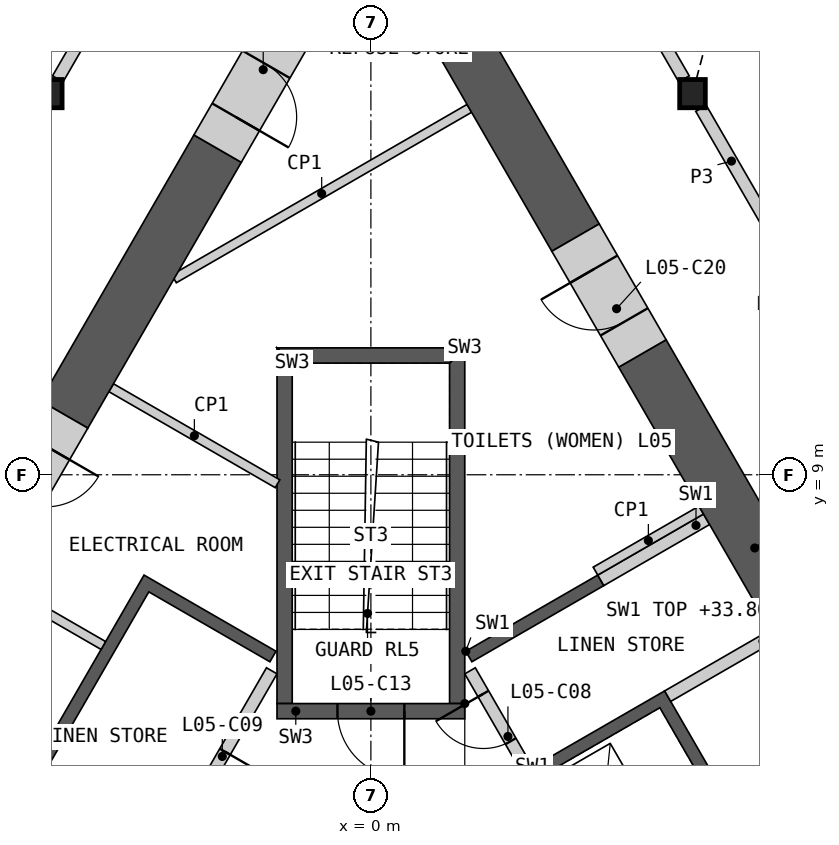
"""IFC4 building model, lengths in metres.
Left out: names, types, materials, properties, quantities, classifications, styles, units other than length and angle.
Written with IfcOpenShell. Run it as: python <this file> out.ifc"""

import sys

from ifc_helpers import new_model, si_unit, direction, frame, frame_2d, origin, origin_2d, place, context, subcontext, project, spatial, polyline, rectangle, i_section, outline, extrude, element, fill, save


model = new_model("IFC4")
c1 = context("Model", 3, precision=1e-05, world=origin(), true_north=direction((0.0, 1.0)))
c2 = subcontext(c1, "Body", "Model", "MODEL_VIEW")
j1 = project(units=[si_unit("LENGTHUNIT", "METRE"), si_unit("PLANEANGLEUNIT", "RADIAN")], contexts=[c1])
p1 = place(None, origin())
s1 = spatial("IfcSite", under=j1, at=p1, CompositionType="ELEMENT")
p2 = place(p1, origin())
s2 = spatial("IfcBuilding", under=s1, at=p2, CompositionType="ELEMENT")
p3 = place(p2, frame((0.0, 0.0, 30.0)))
s3 = spatial("IfcBuildingStorey", under=s2, at=p3, CompositionType="ELEMENT", Elevation=30.0)
for number, where, z_axis, x_axis in (
    (1, (-5.289, 15.269, 0.0), (0.0, 0.0, 1.0), (1.0, 0.0, 0.0)),
    (2, (5.289, 15.269, 0.0), (0.0, 0.0, 1.0), (1.0, 0.0, 0.0)),
):
    element("IfcColumn", number, at=place(p3, frame(where, z_axis=z_axis, x_axis=x_axis)), inside=s3, PredefinedType="COLUMN", context=c2, shape_type="SweptSolid", body=[
        extrude(i_section(OverallWidth=0.421, OverallDepth=0.465, WebThickness=0.045, FlangeThickness=0.072, at=origin_2d()), origin(), (0.0, 0.0, 1.0), 4.2),
    ])
p4 = place(p3, origin())
e3 = element("IfcWall", 3, at=p4, inside=s3, PredefinedType="SHEAR", context=c2, shape_type="SweptSolid", body=[
    extrude(outline(polyline([(1.561, 6.097), (3.731, 7.35), (3.831, 7.177), (1.66, 5.924), (1.561, 6.097)])), origin(), (0.0, 0.0, 1.0), 3.8),
])
p5 = place(p3, origin())
e4 = element("IfcWall", 4, at=p5, inside=s3, PredefinedType="SHEAR", context=c2, shape_type="SweptSolid", body=[
    extrude(outline(polyline([(2.66, 4.192), (4.831, 5.445), (8.231, -0.444), (6.061, -1.697), (5.96, -1.524), (7.952, -0.374), (6.952, 1.358), (4.96, 0.208), (4.861, 0.381), (6.852, 1.531), (5.852, 3.263), (3.861, 2.113), (3.76, 2.287), (5.752, 3.437), (4.752, 5.169), (2.76, 4.019), (2.66, 4.192)])), origin(), (0.0, 0.0, 1.0), 3.8),
])
p6 = place(p3, frame((5.817, -1.476, 0.0), z_axis=(0.0, 0.0, 1.0), x_axis=(-0.500002616675, 0.866023893041, 0.0)))
e5 = element("IfcWall", 5, at=p6, inside=s3, PredefinedType="SOLIDWALL", context=c2, shape_type="SweptSolid", body=[
    extrude(rectangle(XDim=8.373, YDim=0.2, at=frame_2d((4.187, 0.0))), origin(), (0.0, 0.0, 1.0), 3.8),
])
p7 = place(p6, frame((0.337, 0.0, 0.0)))
e6 = element("IfcOpeningElement", 6, at=p7, cuts=e5, PredefinedType="OPENING", context=c2, shape_type="SweptSolid", body=[
    extrude(rectangle(XDim=1.1, YDim=2.1, at=frame_2d((0.55, 1.05))), frame((0.0, 0.11, 0.0), z_axis=(0.0, -1.0, 0.0), x_axis=(1.0, 0.0, 0.0)), (0.0, 0.0, 1.0), 0.22),
])
p8 = place(p6, frame((2.537, 0.0, 0.0)))
e7 = element("IfcOpeningElement", 7, at=p8, cuts=e5, PredefinedType="OPENING", context=c2, shape_type="SweptSolid", body=[
    extrude(rectangle(XDim=1.1, YDim=2.1, at=frame_2d((0.55, 1.05))), frame((0.0, 0.11, 0.0), z_axis=(0.0, -1.0, 0.0), x_axis=(1.0, 0.0, 0.0)), (0.0, 0.0, 1.0), 0.22),
])
p9 = place(p6, frame((4.737, 0.0, 0.0)))
e8 = element("IfcOpeningElement", 8, at=p9, cuts=e5, PredefinedType="OPENING", context=c2, shape_type="SweptSolid", body=[
    extrude(rectangle(XDim=1.1, YDim=2.1, at=frame_2d((0.55, 1.05))), frame((0.0, 0.11, 0.0), z_axis=(0.0, -1.0, 0.0), x_axis=(1.0, 0.0, 0.0)), (0.0, 0.0, 1.0), 0.22),
])
p10 = place(p6, frame((7.037, 0.0, 0.0)))
e9 = element("IfcOpeningElement", 9, at=p10, cuts=e5, PredefinedType="OPENING", context=c2, shape_type="SweptSolid", body=[
    extrude(rectangle(XDim=0.9, YDim=2.1, at=frame_2d((0.45, 1.05))), frame((0.0, 0.11, 0.0), z_axis=(0.0, -1.0, 0.0), x_axis=(1.0, 0.0, 0.0)), (0.0, 0.0, 1.0), 0.22),
])
p11 = place(p3, frame((4.881, 5.358, 0.0), z_axis=(0.0, 0.0, 1.0), x_axis=(0.866035824272, 0.499981950752, 0.0)))
e10 = element("IfcWall", 10, at=p11, inside=s3, PredefinedType="SHEAR", context=c2, shape_type="SweptSolid", body=[
    extrude(rectangle(XDim=2.009, YDim=0.2, at=frame_2d((1.004, 0.0))), origin(), (0.0, 0.0, 1.0), 3.8),
])
p12 = place(p3, frame((3.781, 7.263, 0.0), z_axis=(0.0, 0.0, 1.0), x_axis=(0.865983199114, 0.50007309351, 0.0)))
e11 = element("IfcWall", 11, at=p12, inside=s3, PredefinedType="SHEAR", context=c2, shape_type="SweptSolid", body=[
    extrude(rectangle(XDim=2.009, YDim=0.2, at=frame_2d((1.004, 0.0))), origin(), (0.0, 0.0, 1.0), 3.8),
])
p13 = place(p3, origin())
e12 = element("IfcWall", 12, at=p13, inside=s3, PredefinedType="SHEAR", context=c2, shape_type="SweptSolid", body=[
    extrude(outline(polyline([(-4.96, 0.208), (-7.131, 1.461), (-3.731, 7.35), (-1.561, 6.097), (-1.66, 5.924), (-3.652, 7.074), (-5.752, 3.437), (-3.76, 2.287), (-3.861, 2.113), (-5.852, 3.263), (-6.852, 1.531), (-4.861, 0.381), (-4.96, 0.208)])), origin(), (0.0, 0.0, 1.0), 3.8),
])
p14 = place(p3, frame((-1.631, 5.776, 0.0), z_axis=(0.0, 0.0, 1.0), x_axis=(-0.499992876559, -0.866029516466, 0.0)))
e13 = element("IfcWall", 13, at=p14, inside=s3, PredefinedType="SOLIDWALL", context=c2, shape_type="SweptSolid", body=[
    extrude(rectangle(XDim=6.486, YDim=0.2, at=frame_2d((3.243, 0.0))), origin(), (0.0, 0.0, 1.0), 3.8),
])
p15 = place(p14, frame((1.537, 0.0, 0.0)))
e14 = element("IfcOpeningElement", 14, at=p15, cuts=e13, PredefinedType="OPENING", context=c2, shape_type="SweptSolid", body=[
    extrude(rectangle(XDim=0.9, YDim=2.1, at=frame_2d((0.45, 1.05))), frame((0.0, 0.11, 0.0), z_axis=(0.0, -1.0, 0.0), x_axis=(1.0, 0.0, 0.0)), (0.0, 0.0, 1.0), 0.22),
])
p16 = place(p3, origin())
e15 = element("IfcWall", 15, at=p16, inside=s3, PredefinedType="SHEAR", context=c2, shape_type="SweptSolid", body=[
    extrude(outline(polyline([(1.544, 5.237), (1.544, 11.087), (1.294, 10.837), (1.294, 5.237), (1.544, 5.237)])), origin(), (0.0, 0.0, 1.0), 3.8),
])
p17 = place(p3, origin())
e16 = element("IfcWall", 16, at=p17, inside=s3, PredefinedType="SHEAR", context=c2, shape_type="SweptSolid", body=[
    extrude(outline(polyline([(1.544, 11.087), (-1.544, 11.087), (-1.294, 10.837), (1.294, 10.837), (1.544, 11.087)])), origin(), (0.0, 0.0, 1.0), 3.8),
])
p18 = place(p3, origin())
e17 = element("IfcWall", 17, at=p18, inside=s3, PredefinedType="SHEAR", context=c2, shape_type="SweptSolid", body=[
    extrude(outline(polyline([(-1.294, 10.837), (-1.544, 11.087), (-1.544, 5.237), (-1.294, 5.237), (-1.294, 10.837)])), origin(), (0.0, 0.0, 1.0), 3.8),
])
p19 = place(p3, frame((1.544, 5.112, 0.0), z_axis=(0.0, 0.0, 1.0), x_axis=(-1.0, 0.0, 0.0)))
e18 = element("IfcWall", 18, at=p19, inside=s3, PredefinedType="SHEAR", context=c2, shape_type="SweptSolid", body=[
    extrude(rectangle(XDim=3.088, YDim=0.25, at=frame_2d((1.544, 0.0))), origin(), (0.0, 0.0, 1.0), 3.8),
])
p20 = place(p19, frame((0.994, 0.0, 0.0)))
e19 = element("IfcOpeningElement", 19, at=p20, cuts=e18, PredefinedType="OPENING", context=c2, shape_type="SweptSolid", body=[
    extrude(rectangle(XDim=1.1, YDim=2.1, at=frame_2d((0.55, 1.05))), frame((0.0, 0.135, 0.0), z_axis=(0.0, -1.0, 0.0), x_axis=(1.0, 0.0, 0.0)), (0.0, 0.0, 1.0), 0.27),
])
for number, where, z_axis, x_axis in (
    (20, (3.693, 7.415, 0.0), (0.0, 0.0, 1.0), (0.866, 0.5, 0.0)),
    (21, (-6.139, 7.196, 0.0), (0.0, 0.0, 1.0), (0.866, -0.5, 0.0)),
):
    element("IfcWall", number, at=place(p3, frame(where, z_axis=z_axis, x_axis=x_axis)), inside=s3, PredefinedType="PARTITIONING", context=c2, shape_type="SweptSolid", body=[
        extrude(rectangle(XDim=2.009, YDim=0.15, at=frame_2d((1.004, 0.0))), origin(), (0.0, 0.0, 1.0), 3.8),
    ])
p21 = place(p3, frame((-4.271, 10.432, 0.0), z_axis=(0.0, 0.0, 1.0), x_axis=(0.866018279777, -0.50001233894, 0.0)))
e22 = element("IfcWall", 22, at=p21, inside=s3, PredefinedType="PARTITIONING", context=c2, shape_type="SweptSolid", body=[
    extrude(rectangle(XDim=3.159, YDim=0.15, at=frame_2d((1.58, 0.0))), origin(), (0.0, 0.0, 1.0), 3.8),
])
p22 = place(p3, frame((1.619, 15.026, 0.0), z_axis=(0.0, 0.0, 1.0), x_axis=(-0.866015917575, -0.500016430238, 0.0)))
e23 = element("IfcWall", 23, at=p22, inside=s3, PredefinedType="PARTITIONING", context=c2, shape_type="SweptSolid", body=[
    extrude(rectangle(XDim=5.607, YDim=0.15, at=frame_2d((2.804, 0.0))), origin(), (0.0, 0.0, 1.0), 3.8),
])
p23 = place(p3, frame((8.16, 4.596, 0.0), z_axis=(0.0, 0.0, 1.0), x_axis=(-0.500012259336, 0.866018325738, 0.0)))
e24 = element("IfcWall", 24, at=p23, inside=s3, PredefinedType="SHEAR", context=c2, shape_type="SweptSolid", body=[
    extrude(rectangle(XDim=7.389, YDim=0.9, at=frame_2d((3.695, 0.0))), origin(), (0.0, 0.0, 1.0), 3.8),
])
p24 = place(p3, frame((3.365, 12.9, 0.0), z_axis=(0.0, 0.0, 1.0), x_axis=(-0.499981657175, 0.86603599376, 0.0)))
e25 = element("IfcWall", 25, at=p24, inside=s3, PredefinedType="SHEAR", context=c2, shape_type="SweptSolid", body=[
    extrude(rectangle(XDim=5.952, YDim=0.9, at=frame_2d((2.976, 0.0))), origin(), (0.0, 0.0, 1.0), 3.8),
])
p25 = place(p3, frame((-2.521, 14.364, 0.0), z_axis=(0.0, 0.0, 1.0), x_axis=(-0.500014099723, -0.866017263153, 0.0)))
e26 = element("IfcWall", 26, at=p25, inside=s3, PredefinedType="SHEAR", context=c2, shape_type="SweptSolid", body=[
    extrude(rectangle(XDim=5.048, YDim=0.9, at=frame_2d((2.524, 0.0))), origin(), (0.0, 0.0, 1.0), 3.8),
])
p26 = place(p3, frame((-5.045, 9.992, 0.0), z_axis=(0.0, 0.0, 1.0), x_axis=(-0.499898558967, -0.866083962871, 0.0)))
e27 = element("IfcWall", 27, at=p26, inside=s3, PredefinedType="SHEAR", context=c2, shape_type="SweptSolid", body=[
    extrude(rectangle(XDim=2.2, YDim=0.9, at=frame_2d((1.1, 0.0))), origin(), (0.0, 0.0, 1.0), 3.8),
])
p27 = place(p26, frame((0.6, 0.0, 0.0)))
e28 = element("IfcOpeningElement", 28, at=p27, cuts=e27, PredefinedType="OPENING", context=c2, shape_type="SweptSolid", body=[
    extrude(rectangle(XDim=1.0, YDim=2.1, at=frame_2d((0.5, 1.05))), frame((0.0, 0.46, 0.0), z_axis=(0.0, -1.0, 0.0), x_axis=(1.0, 0.0, 0.0)), (0.0, 0.0, 1.0), 0.92),
])
p28 = place(p3, frame((4.466, 10.995, 0.0), z_axis=(0.0, 0.0, 1.0), x_axis=(-0.500077893725, 0.86598042715, 0.0)))
e29 = element("IfcWall", 29, at=p28, inside=s3, PredefinedType="SHEAR", context=c2, shape_type="SweptSolid", body=[
    extrude(rectangle(XDim=2.2, YDim=0.9, at=frame_2d((1.1, 0.0))), origin(), (0.0, 0.0, 1.0), 3.8),
])
p29 = place(p28, frame((0.6, 0.0, 0.0)))
e30 = element("IfcOpeningElement", 30, at=p29, cuts=e29, PredefinedType="OPENING", context=c2, shape_type="SweptSolid", body=[
    extrude(rectangle(XDim=1.0, YDim=2.1, at=frame_2d((0.5, 1.05))), frame((0.0, 0.46, 0.0), z_axis=(0.0, -1.0, 0.0), x_axis=(1.0, 0.0, 0.0)), (0.0, 0.0, 1.0), 0.92),
])
p30 = place(p3, frame((-1.421, 16.269, 0.0), z_axis=(0.0, 0.0, 1.0), x_axis=(-0.50002983664, -0.866008176907, 0.0)))
e31 = element("IfcWall", 31, at=p30, inside=s3, PredefinedType="SHEAR", context=c2, shape_type="SweptSolid", body=[
    extrude(rectangle(XDim=2.2, YDim=0.9, at=frame_2d((1.1, 0.0))), origin(), (0.0, 0.0, 1.0), 3.8),
])
p31 = place(p30, frame((0.6, 0.0, 0.0)))
e32 = element("IfcOpeningElement", 32, at=p31, cuts=e31, PredefinedType="OPENING", context=c2, shape_type="SweptSolid", body=[
    extrude(rectangle(XDim=1.0, YDim=2.1, at=frame_2d((0.5, 1.05))), frame((0.0, 0.46, 0.0), z_axis=(0.0, -1.0, 0.0), x_axis=(1.0, 0.0, 0.0)), (0.0, 0.0, 1.0), 0.92),
])
p32 = place(p3, frame((5.429, 15.026, 0.0), z_axis=(0.0, 0.0, 1.0), x_axis=(0.50001002959, -0.86601961312, 0.0)))
e33 = element("IfcWall", 33, at=p32, inside=s3, PredefinedType="PARTITIONING", context=c2, shape_type="SweptSolid", body=[
    extrude(rectangle(XDim=10.019, YDim=0.2, at=frame_2d((5.009, 0.0))), origin(), (0.0, 0.0, 1.0), 3.8),
])
p33 = place(p32, frame((7.266, 0.0, 0.0)))
e34 = element("IfcOpeningElement", 34, at=p33, cuts=e33, PredefinedType="OPENING", context=c2, shape_type="SweptSolid", body=[
    extrude(rectangle(XDim=1.0, YDim=2.1, at=frame_2d((0.5, 1.05))), frame((0.0, 0.11, 0.0), z_axis=(0.0, -1.0, 0.0), x_axis=(1.0, 0.0, 0.0)), (0.0, 0.0, 1.0), 0.22),
])
p34 = place(p32, frame((2.254, 0.0, 0.0)))
e35 = element("IfcOpeningElement", 35, at=p34, cuts=e33, PredefinedType="OPENING", context=c2, shape_type="SweptSolid", body=[
    extrude(rectangle(XDim=1.0, YDim=2.1, at=frame_2d((0.5, 1.05))), frame((0.0, 0.11, 0.0), z_axis=(0.0, -1.0, 0.0), x_axis=(1.0, 0.0, 0.0)), (0.0, 0.0, 1.0), 0.22),
])
p35 = place(p3, frame((-5.149, 15.511, 0.0), z_axis=(0.0, 0.0, 1.0), x_axis=(0.500001069878, 0.866024786089, 0.0)))
e36 = element("IfcWall", 36, at=p35, inside=s3, PredefinedType="PARTITIONING", context=c2, shape_type="SweptSolid", body=[
    extrude(rectangle(XDim=6.473, YDim=0.2, at=frame_2d((3.236, 0.0))), origin(), (0.0, 0.0, 1.0), 3.8),
])
p36 = place(p3, frame((1.913, 21.116, 0.0), z_axis=(0.0, 0.0, 1.0), x_axis=(0.500001069878, -0.866024786089, 0.0)))
e37 = element("IfcWall", 37, at=p36, inside=s3, PredefinedType="PARTITIONING", context=c2, shape_type="SweptSolid", body=[
    extrude(rectangle(XDim=6.473, YDim=0.2, at=frame_2d((3.236, 0.0))), origin(), (0.0, 0.0, 1.0), 3.8),
])
p37 = place(p36, frame((0.96, 0.0, 0.0)))
e38 = element("IfcOpeningElement", 38, at=p37, cuts=e37, PredefinedType="OPENING", context=c2, shape_type="SweptSolid", body=[
    extrude(rectangle(XDim=1.0, YDim=2.1, at=frame_2d((0.5, 1.05))), frame((0.0, 0.11, 0.0), z_axis=(0.0, -1.0, 0.0), x_axis=(1.0, 0.0, 0.0)), (0.0, 0.0, 1.0), 0.22),
])
p38 = place(p10, origin())
e39 = element("IfcDoor", 39, at=p38, inside=s3, OperationType="SINGLE_SWING_RIGHT", PredefinedType="DOOR", context=c2, shape_type="SweptSolid", body=[
    extrude(rectangle(XDim=0.9, YDim=2.1, at=frame_2d((0.45, 1.05))), frame((0.0, 0.025, 0.0), z_axis=(0.0, -1.0, 0.0), x_axis=(1.0, 0.0, 0.0)), (0.0, 0.0, 1.0), 0.05),
])
fill(e9, e39)
p39 = place(p15, origin())
e40 = element("IfcDoor", 40, at=p39, inside=s3, OperationType="SINGLE_SWING_LEFT", PredefinedType="DOOR", context=c2, shape_type="SweptSolid", body=[
    extrude(rectangle(XDim=0.9, YDim=2.1, at=frame_2d((0.45, 1.05))), frame((0.0, 0.025, 0.0), z_axis=(0.0, -1.0, 0.0), x_axis=(1.0, 0.0, 0.0)), (0.0, 0.0, 1.0), 0.05),
])
fill(e14, e40)
p40 = place(p20, origin())
e41 = element("IfcDoor", 41, at=p40, inside=s3, OperationType="SINGLE_SWING_LEFT", PredefinedType="DOOR", context=c2, shape_type="SweptSolid", body=[
    extrude(rectangle(XDim=1.1, YDim=2.1, at=frame_2d((0.55, 1.05))), frame((0.0, 0.025, 0.0), z_axis=(0.0, -1.0, 0.0), x_axis=(1.0, 0.0, 0.0)), (0.0, 0.0, 1.0), 0.05),
])
fill(e19, e41)
p41 = place(p27, origin())
e42 = element("IfcDoor", 42, at=p41, inside=s3, OperationType="SINGLE_SWING_LEFT", PredefinedType="DOOR", context=c2, shape_type="SweptSolid", body=[
    extrude(rectangle(XDim=1.0, YDim=2.1, at=frame_2d((0.5, 1.05))), frame((0.0, 0.205, 0.0), z_axis=(0.0, -1.0, 0.0), x_axis=(1.0, 0.0, 0.0)), (0.0, 0.0, 1.0), 0.05),
])
fill(e28, e42)
p42 = place(p29, origin())
e43 = element("IfcDoor", 43, at=p42, inside=s3, OperationType="SINGLE_SWING_RIGHT", PredefinedType="DOOR", context=c2, shape_type="SweptSolid", body=[
    extrude(rectangle(XDim=1.0, YDim=2.1, at=frame_2d((0.5, 1.05))), frame((0.0, 0.205, 0.0), z_axis=(0.0, -1.0, 0.0), x_axis=(1.0, 0.0, 0.0)), (0.0, 0.0, 1.0), 0.05),
])
fill(e30, e43)
p43 = place(p31, origin())
e44 = element("IfcDoor", 44, at=p43, inside=s3, OperationType="SINGLE_SWING_RIGHT", PredefinedType="DOOR", context=c2, shape_type="SweptSolid", body=[
    extrude(rectangle(XDim=1.0, YDim=2.1, at=frame_2d((0.5, 1.05))), frame((0.0, 0.205, 0.0), z_axis=(0.0, -1.0, 0.0), x_axis=(1.0, 0.0, 0.0)), (0.0, 0.0, 1.0), 0.05),
])
fill(e32, e44)
save(model, sys.argv[1])
